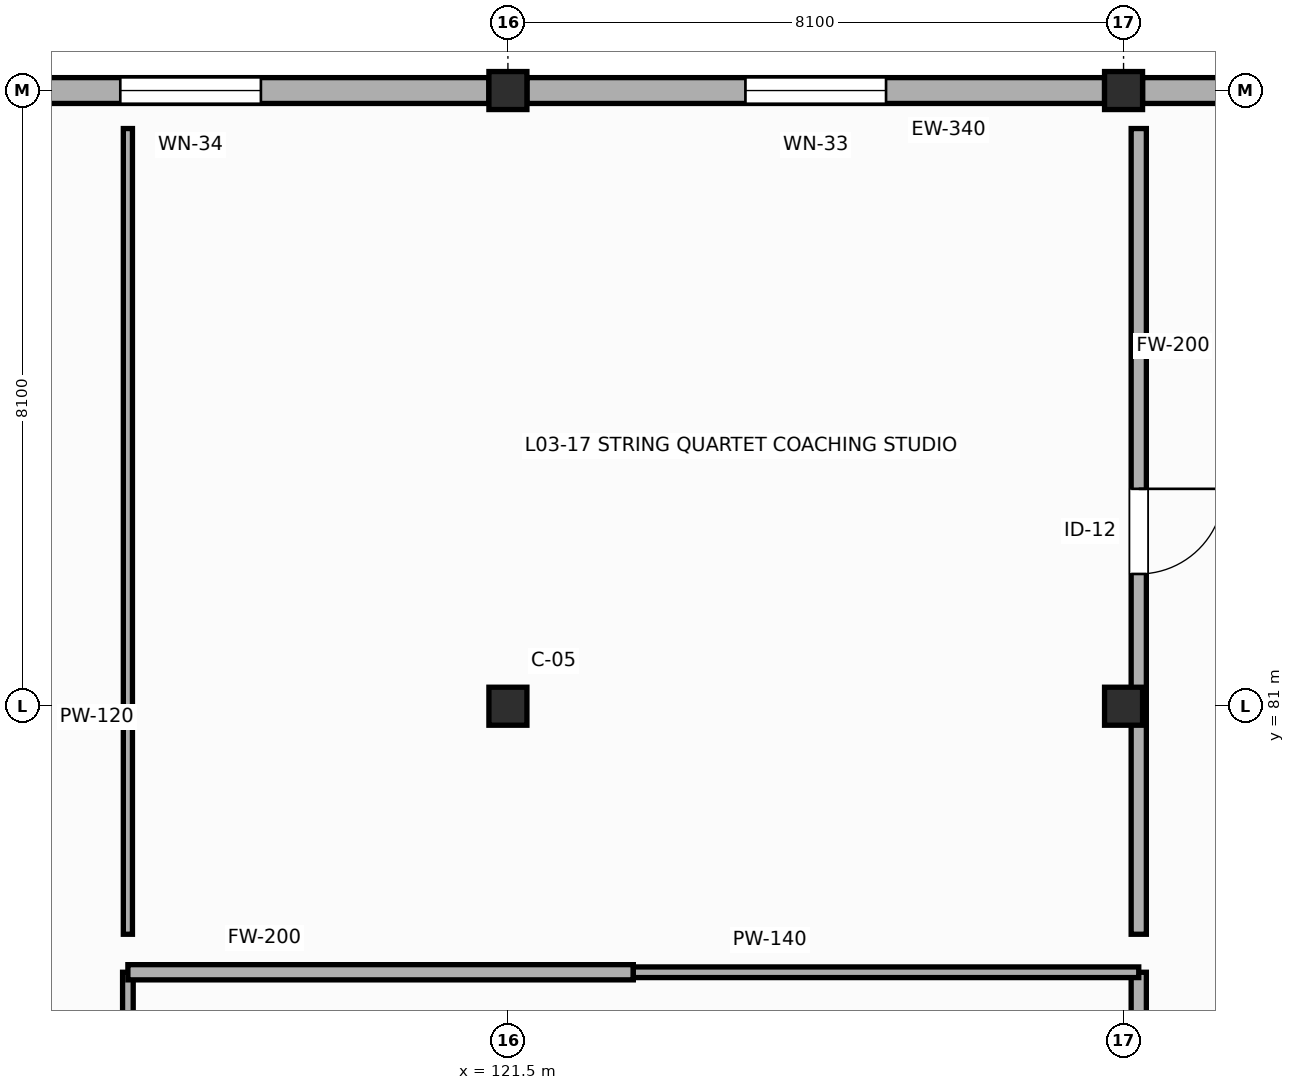
"""IFC4 building model, lengths in metres.
Left out: names, types, materials, properties, quantities, classifications, styles, units other than length and angle.
Written with IfcOpenShell. Run it as: python <this file> out.ifc"""

import sys

from ifc_helpers import new_model, si_unit, direction, frame, frame_2d, origin, origin_2d, place, context, subcontext, project, spatial, rectangle, extrude, element, fill, save


model = new_model("IFC4")
c1 = context("Model", 3, precision=1e-05, world=origin(), true_north=direction((0.0, 1.0)))
c2 = subcontext(c1, "Body", "Model", "MODEL_VIEW")
j1 = project(units=[si_unit("LENGTHUNIT", "METRE"), si_unit("PLANEANGLEUNIT", "RADIAN")], contexts=[c1])
p1 = place(None, origin())
s1 = spatial("IfcSite", under=j1, at=p1, CompositionType="ELEMENT")
p2 = place(p1, origin())
s2 = spatial("IfcBuilding", under=s1, at=p2, CompositionType="ELEMENT")
p3 = place(p2, frame((0.0, 0.0, 15.0)))
s3 = spatial("IfcBuildingStorey", under=s2, at=p3, CompositionType="ELEMENT", Elevation=15.0)
for number, where, z_axis, x_axis in (
    (1, (121.5, 81.0, 0.0), (0.0, 0.0, 1.0), (1.0, 0.0, 0.0)),
    (2, (121.5, 89.1, 0.0), (0.0, 0.0, 1.0), (1.0, 0.0, 0.0)),
    (3, (129.6, 81.0, 0.0), (0.0, 0.0, 1.0), (1.0, 0.0, 0.0)),
    (4, (129.6, 89.1, 0.0), (0.0, 0.0, 1.0), (1.0, 0.0, 0.0)),
):
    element("IfcColumn", number, at=place(p3, frame(where, z_axis=z_axis, x_axis=x_axis)), inside=s3, PredefinedType="COLUMN", context=c2, shape_type="SweptSolid", body=[
        extrude(rectangle(XDim=0.5, YDim=0.5, at=origin_2d()), origin(), (0.0, 0.0, 1.0), 4.2),
    ])
p4 = place(p3, frame((137.45, 89.1, 0.0), z_axis=(0.0, 0.0, 1.0), x_axis=(-1.0, 0.0, 0.0)))
e5 = element("IfcWall", 5, at=p4, inside=s3, PredefinedType="SOLIDWALL", context=c2, shape_type="SweptSolid", body=[
    extrude(rectangle(XDim=7.6, YDim=0.34, at=frame_2d((3.8, 0.0))), origin(), (0.0, 0.0, 1.0), 3.527),
])
p5 = place(p3, frame((129.35, 89.1, 0.0), z_axis=(0.0, 0.0, 1.0), x_axis=(-1.0, 0.0, 0.0)))
e6 = element("IfcWall", 6, at=p5, inside=s3, PredefinedType="SOLIDWALL", context=c2, shape_type="SweptSolid", body=[
    extrude(rectangle(XDim=7.6, YDim=0.34, at=frame_2d((3.8, 0.0))), origin(), (0.0, 0.0, 1.0), 3.475),
])
p6 = place(p5, frame((2.875, 0.0, 0.9)))
e7 = element("IfcOpeningElement", 7, at=p6, cuts=e6, PredefinedType="OPENING", context=c2, shape_type="SweptSolid", body=[
    extrude(rectangle(XDim=1.85, YDim=1.6, at=frame_2d((0.925, 0.8))), frame((0.0, 0.18, 0.0), z_axis=(0.0, -1.0, 0.0), x_axis=(1.0, 0.0, 0.0)), (0.0, 0.0, 1.0), 0.36),
])
p7 = place(p3, frame((121.25, 89.1, 0.0), z_axis=(0.0, 0.0, 1.0), x_axis=(-1.0, 0.0, 0.0)))
e8 = element("IfcWall", 8, at=p7, inside=s3, PredefinedType="SOLIDWALL", context=c2, shape_type="SweptSolid", body=[
    extrude(rectangle(XDim=7.85, YDim=0.34, at=frame_2d((3.925, 0.0))), origin(), (0.0, 0.0, 1.0), 3.527),
])
p8 = place(p7, frame((3.0, 0.0, 0.9)))
e9 = element("IfcOpeningElement", 9, at=p8, cuts=e8, PredefinedType="OPENING", context=c2, shape_type="SweptSolid", body=[
    extrude(rectangle(XDim=1.85, YDim=2.0, at=frame_2d((0.925, 1.0))), frame((0.0, 0.18, 0.0), z_axis=(0.0, -1.0, 0.0), x_axis=(1.0, 0.0, 0.0)), (0.0, 0.0, 1.0), 0.36),
])
p9 = place(p3, frame((129.8, 77.5, 0.0), z_axis=(0.0, 0.0, 1.0), x_axis=(0.0, -1.0, 0.0)))
e10 = element("IfcWall", 10, at=p9, inside=s3, PredefinedType="PARTITIONING", context=c2, shape_type="SweptSolid", body=[
    extrude(rectangle(XDim=10.5, YDim=0.2, at=frame_2d((5.25, 0.0))), origin(), (0.0, 0.0, 1.0), 3.244),
])
p10 = place(p9, frame((6.235, 0.0, 0.0)))
e11 = element("IfcOpeningElement", 11, at=p10, cuts=e10, PredefinedType="OPENING", context=c2, shape_type="SweptSolid", body=[
    extrude(rectangle(XDim=1.18, YDim=2.22, at=frame_2d((0.59, 1.11))), frame((0.0, 0.11, 0.0), z_axis=(0.0, -1.0, 0.0), x_axis=(1.0, 0.0, 0.0)), (0.0, 0.0, 1.0), 0.22),
])
p11 = place(p3, frame((116.5, 67.0, 0.0), z_axis=(0.0, 0.0, 1.0), x_axis=(0.0, 1.0, 0.0)))
e12 = element("IfcWall", 12, at=p11, inside=s3, PredefinedType="PARTITIONING", context=c2, shape_type="SweptSolid", body=[
    extrude(rectangle(XDim=10.5, YDim=0.14, at=frame_2d((5.25, 0.0))), origin(), (0.0, 0.0, 1.0), 3.92),
])
p12 = place(p3, frame((116.5, 77.5, 0.0), z_axis=(0.0, 0.0, 1.0), x_axis=(1.0, 0.0, 0.0)))
e13 = element("IfcWall", 13, at=p12, inside=s3, PredefinedType="PARTITIONING", context=c2, shape_type="SweptSolid", body=[
    extrude(rectangle(XDim=6.65, YDim=0.2, at=frame_2d((3.325, 0.0))), origin(), (0.0, 0.0, 1.0), 3.92),
])
p13 = place(p3, frame((123.15, 77.5, 0.0), z_axis=(0.0, 0.0, 1.0), x_axis=(1.0, 0.0, 0.0)))
e14 = element("IfcWall", 14, at=p13, inside=s3, PredefinedType="PARTITIONING", context=c2, shape_type="SweptSolid", body=[
    extrude(rectangle(XDim=6.65, YDim=0.14, at=frame_2d((3.325, 0.0))), origin(), (0.0, 0.0, 1.0), 3.92),
])
p14 = place(p3, frame((129.8, 88.6, 0.0), z_axis=(0.0, 0.0, 1.0), x_axis=(0.0, -1.0, 0.0)))
e15 = element("IfcWall", 15, at=p14, inside=s3, PredefinedType="PARTITIONING", context=c2, shape_type="SweptSolid", body=[
    extrude(rectangle(XDim=10.6, YDim=0.2, at=frame_2d((5.3, 0.0))), origin(), (0.0, 0.0, 1.0), 3.344),
])
p15 = place(p14, frame((4.74, 0.0, 0.0)))
e16 = element("IfcOpeningElement", 16, at=p15, cuts=e15, PredefinedType="OPENING", context=c2, shape_type="SweptSolid", body=[
    extrude(rectangle(XDim=1.12, YDim=2.18, at=frame_2d((0.56, 1.09))), frame((0.0, 0.11, 0.0), z_axis=(0.0, -1.0, 0.0), x_axis=(1.0, 0.0, 0.0)), (0.0, 0.0, 1.0), 0.22),
])
p16 = place(p3, frame((116.5, 78.0, 0.0), z_axis=(0.0, 0.0, 1.0), x_axis=(0.0, 1.0, 0.0)))
e17 = element("IfcWall", 17, at=p16, inside=s3, PredefinedType="PARTITIONING", context=c2, shape_type="SweptSolid", body=[
    extrude(rectangle(XDim=10.6, YDim=0.12, at=frame_2d((5.3, 0.0))), origin(), (0.0, 0.0, 1.0), 3.92),
])
p17 = place(p6, origin())
e18 = element("IfcWindow", 18, at=p17, inside=s3, PartitioningType="SINGLE_PANEL", PredefinedType="WINDOW", context=c2, shape_type="SweptSolid", body=[
    extrude(rectangle(XDim=1.85, YDim=1.6, at=frame_2d((0.925, 0.8))), frame((0.0, 0.03, 0.0), z_axis=(0.0, -1.0, 0.0), x_axis=(1.0, 0.0, 0.0)), (0.0, 0.0, 1.0), 0.06),
])
fill(e7, e18)
p18 = place(p8, origin())
e19 = element("IfcWindow", 19, at=p18, inside=s3, PartitioningType="SINGLE_PANEL", PredefinedType="WINDOW", context=c2, shape_type="SweptSolid", body=[
    extrude(rectangle(XDim=1.85, YDim=2.0, at=frame_2d((0.925, 1.0))), frame((0.0, 0.03, 0.0), z_axis=(0.0, -1.0, 0.0), x_axis=(1.0, 0.0, 0.0)), (0.0, 0.0, 1.0), 0.06),
])
fill(e9, e19)
p19 = place(p15, origin())
e20 = element("IfcDoor", 20, at=p19, inside=s3, OperationType="SINGLE_SWING_LEFT", PredefinedType="DOOR", context=c2, shape_type="SweptSolid", body=[
    extrude(rectangle(XDim=1.12, YDim=2.18, at=frame_2d((0.56, 1.09))), frame((0.0, 0.025, 0.0), z_axis=(0.0, -1.0, 0.0), x_axis=(1.0, 0.0, 0.0)), (0.0, 0.0, 1.0), 0.05),
])
fill(e16, e20)
save(model, sys.argv[1])
